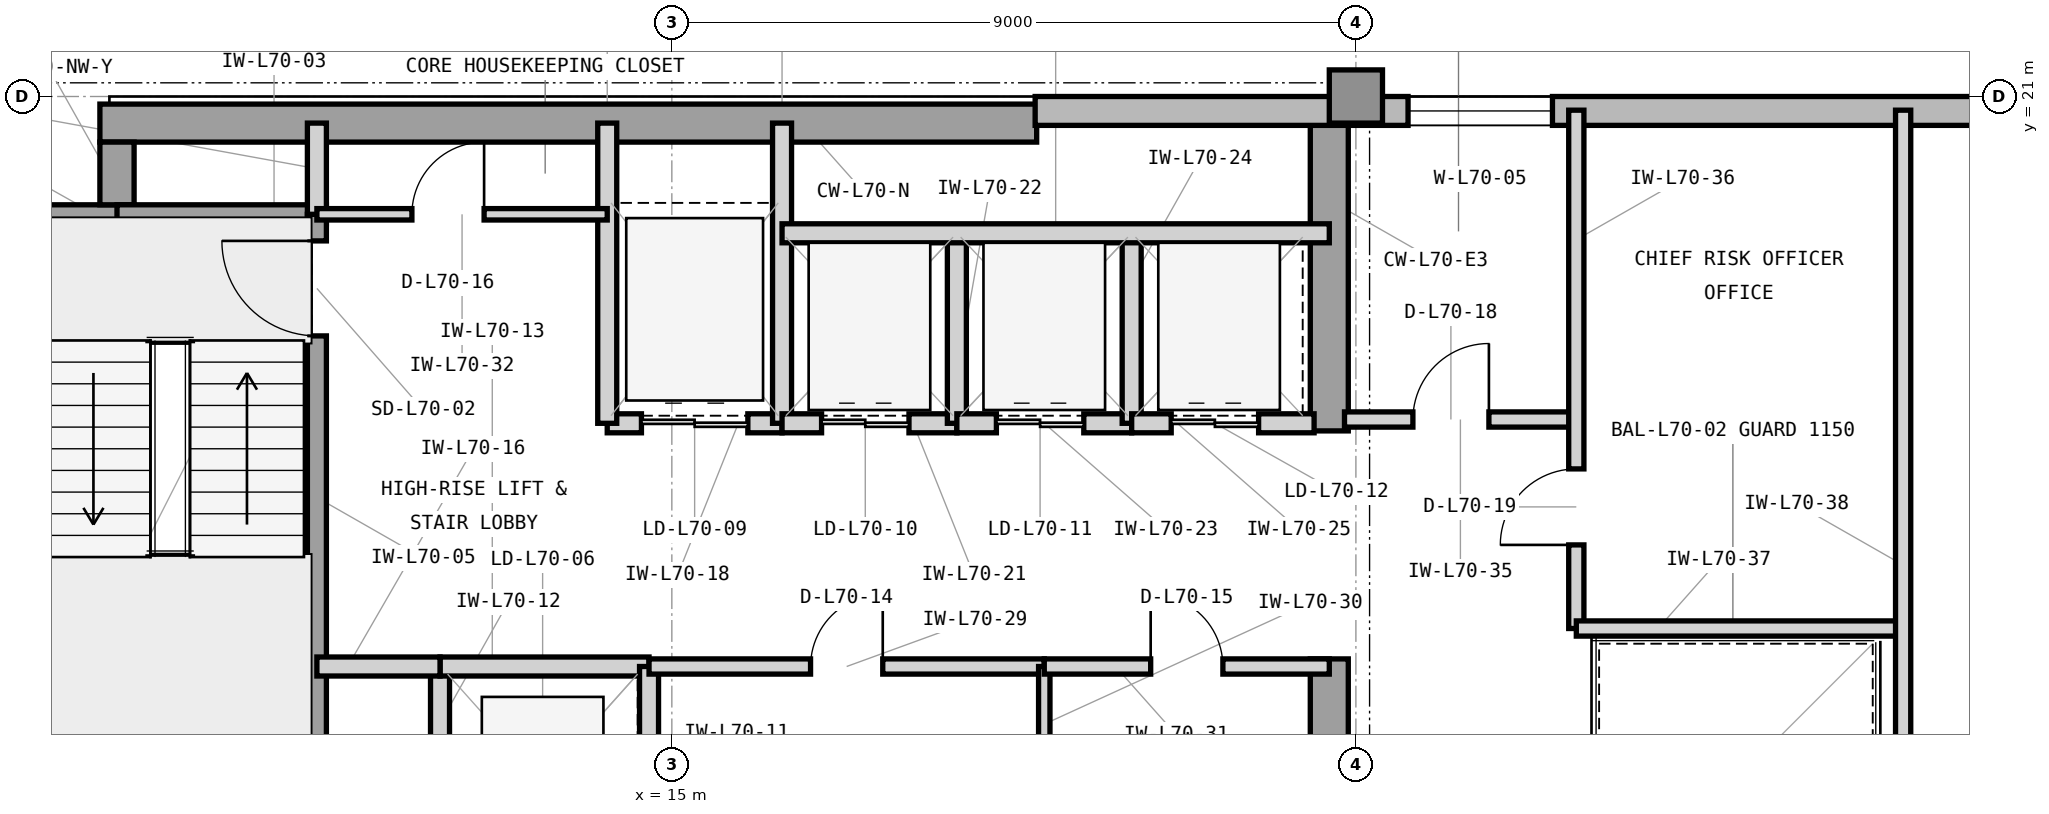
"""IFC4 building model, lengths in metres.
Left out: names, types, materials, properties, quantities, classifications, styles, units other than length and angle.
Written with IfcOpenShell. Run it as: python <this file> out.ifc"""

import sys

from ifc_helpers import new_model, si_unit, direction, frame, frame_2d, origin, origin_2d, place, context, subcontext, project, spatial, rectangle, extrude, element, fill, save


model = new_model("IFC4")
c1 = context("Model", 3, precision=1e-05, world=origin(), true_north=direction((0.0, 1.0)))
c2 = subcontext(c1, "Body", "Model", "MODEL_VIEW")
j1 = project(units=[si_unit("LENGTHUNIT", "METRE"), si_unit("PLANEANGLEUNIT", "RADIAN")], contexts=[c1])
p1 = place(None, origin())
s1 = spatial("IfcSite", under=j1, at=p1, CompositionType="ELEMENT")
p2 = place(p1, origin())
s2 = spatial("IfcBuilding", under=s1, at=p2, CompositionType="ELEMENT")
p3 = place(p2, frame((0.0, 0.0, 285.9)))
s3 = spatial("IfcBuildingStorey", under=s2, at=p3, CompositionType="ELEMENT", Elevation=285.9)
p4 = place(p3, frame((7.475, 20.65, 0.0), z_axis=(0.0, 0.0, 1.0), x_axis=(1.0, 0.0, 0.0)))
e1 = element("IfcWall", 1, at=p4, inside=s3, PredefinedType="SHEAR", context=c2, shape_type="SweptSolid", body=[
    extrude(rectangle(XDim=12.325, YDim=0.5, at=frame_2d((6.163, 0.0))), origin(), (0.0, 0.0, 1.0), 3.9),
])
p5 = place(p3, frame((23.65, 10.4, 0.0), z_axis=(0.0, 0.0, 1.0), x_axis=(0.0, 1.0, 0.0)))
e2 = element("IfcWall", 2, at=p5, inside=s3, PredefinedType="SHEAR", context=c2, shape_type="SweptSolid", body=[
    extrude(rectangle(XDim=3.2, YDim=0.5, at=frame_2d((1.6, 0.0))), origin(), (0.0, 0.0, 1.0), 3.9),
])
p6 = place(p3, frame((23.65, 16.6, 0.0), z_axis=(0.0, 0.0, 1.0), x_axis=(0.0, 1.0, 0.0)))
e3 = element("IfcWall", 3, at=p6, inside=s3, PredefinedType="SHEAR", context=c2, shape_type="SweptSolid", body=[
    extrude(rectangle(XDim=4.05, YDim=0.5, at=frame_2d((2.025, 0.0))), origin(), (0.0, 0.0, 1.0), 3.9),
])
p7 = place(p3, frame((6.6, 19.35, 0.0), z_axis=(0.0, 0.0, 1.0), x_axis=(1.0, 0.0, 0.0)))
e4 = element("IfcWall", 4, at=p7, inside=s3, PredefinedType="SHEAR", context=c2, shape_type="SweptSolid", body=[
    extrude(rectangle(XDim=1.325, YDim=0.45, at=frame_2d((0.663, 0.0))), origin(), (0.0, 0.0, 1.0), 3.9),
])
p8 = place(p3, frame((7.7, 19.575, 0.0), z_axis=(0.0, 0.0, 1.0), x_axis=(0.0, 1.0, 0.0)))
e5 = element("IfcWall", 5, at=p8, inside=s3, PredefinedType="SHEAR", context=c2, shape_type="SweptSolid", body=[
    extrude(rectangle(XDim=0.825, YDim=0.45, at=frame_2d((0.413, 0.0))), origin(), (0.0, 0.0, 1.0), 3.9),
])
p9 = place(p3, frame((24.0, 21.0, 0.0), z_axis=(0.0, 0.0, 1.0), x_axis=(1.0, 0.0, 0.0)))
e6 = element("IfcColumn", 6, at=p9, inside=s3, PredefinedType="COLUMN", context=c2, shape_type="SweptSolid", body=[
    extrude(rectangle(XDim=0.7, YDim=0.7, at=origin_2d()), origin(), (0.0, 0.0, 1.0), 3.9),
])
p10 = place(p3, frame((49.4, 20.81, 0.0), z_axis=(0.0, 0.0, 1.0), x_axis=(-1.0, 0.0, 0.0)))
e7 = element("IfcWall", 7, at=p10, inside=s3, PredefinedType="STANDARD", context=c2, shape_type="SweptSolid", body=[
    extrude(rectangle(XDim=29.62, YDim=0.38, at=frame_2d((14.81, 0.0))), origin(), (0.0, 0.0, 1.0), 3.715),
])
p11 = place(p10, frame((22.814, 0.0, 0.8)))
e8 = element("IfcOpeningElement", 8, at=p11, cuts=e7, PredefinedType="OPENING", context=c2, shape_type="SweptSolid", body=[
    extrude(rectangle(XDim=1.9, YDim=2.35, at=frame_2d((0.95, 1.175))), frame((0.0, 0.2, 0.0), z_axis=(0.0, -1.0, 0.0), x_axis=(1.0, 0.0, 0.0)), (0.0, 0.0, 1.0), 0.4),
])
p12 = place(p10, frame((12.804, 0.0, 0.8)))
e9 = element("IfcOpeningElement", 9, at=p12, cuts=e7, PredefinedType="OPENING", context=c2, shape_type="SweptSolid", body=[
    extrude(rectangle(XDim=2.6, YDim=2.35, at=frame_2d((1.3, 1.175))), frame((0.0, 0.2, 0.0), z_axis=(0.0, -1.0, 0.0), x_axis=(1.0, 0.0, 0.0)), (0.0, 0.0, 1.0), 0.4),
])
p13 = place(p10, frame((8.354, 0.0, 0.8)))
e10 = element("IfcOpeningElement", 10, at=p13, cuts=e7, PredefinedType="OPENING", context=c2, shape_type="SweptSolid", body=[
    extrude(rectangle(XDim=2.6, YDim=2.35, at=frame_2d((1.3, 1.175))), frame((0.0, 0.2, 0.0), z_axis=(0.0, -1.0, 0.0), x_axis=(1.0, 0.0, 0.0)), (0.0, 0.0, 1.0), 0.4),
])
p14 = place(p3, frame((7.7, 19.45, 0.0), z_axis=(0.0, 0.0, 1.0), x_axis=(1.0, 0.0, 0.0)))
e11 = element("IfcWall", 11, at=p14, inside=s3, PredefinedType="SHEAR", context=c2, shape_type="SweptSolid", body=[
    extrude(rectangle(XDim=2.755, YDim=0.25, at=frame_2d((1.377, 0.0))), origin(), (0.0, 0.0, 1.0), 3.9),
])
p15 = place(p3, frame((10.33, 12.0, 0.0), z_axis=(0.0, 0.0, 1.0), x_axis=(0.0, 1.0, 0.0)))
e12 = element("IfcWall", 12, at=p15, inside=s3, PredefinedType="SHEAR", context=c2, shape_type="SweptSolid", body=[
    extrude(rectangle(XDim=7.45, YDim=0.25, at=frame_2d((3.725, 0.0))), origin(), (0.0, 0.0, 1.0), 3.9),
])
p16 = place(p15, frame((5.85, 0.0, 0.0)))
e13 = element("IfcOpeningElement", 13, at=p16, cuts=e12, PredefinedType="OPENING", context=c2, shape_type="SweptSolid", body=[
    extrude(rectangle(XDim=1.25, YDim=2.2, at=frame_2d((0.625, 1.1))), frame((0.0, 0.135, 0.0), z_axis=(0.0, -1.0, 0.0), x_axis=(1.0, 0.0, 0.0)), (0.0, 0.0, 1.0), 0.27),
])
p17 = place(p3, frame((10.33, 19.45, 0.0), z_axis=(0.0, 0.0, 1.0), x_axis=(0.0, 1.0, 0.0)))
e14 = element("IfcWall", 14, at=p17, inside=s3, PredefinedType="PARTITIONING", context=c2, shape_type="SweptSolid", body=[
    extrude(rectangle(XDim=1.2, YDim=0.25, at=frame_2d((0.6, 0.0))), origin(), (0.0, 0.0, 1.0), 3.705),
])
p18 = place(p3, frame((11.95, 10.5, 0.0), z_axis=(0.0, 0.0, 1.0), x_axis=(0.0, 1.0, 0.0)))
e15 = element("IfcWall", 15, at=p18, inside=s3, PredefinedType="PARTITIONING", context=c2, shape_type="SweptSolid", body=[
    extrude(rectangle(XDim=3.0, YDim=0.25, at=frame_2d((1.5, 0.0))), origin(), (0.0, 0.0, 1.0), 3.705),
])
p19 = place(p3, frame((11.95, 13.5, 0.0), z_axis=(0.0, 0.0, 1.0), x_axis=(1.0, 0.0, 0.0)))
e16 = element("IfcWall", 16, at=p19, inside=s3, PredefinedType="PARTITIONING", context=c2, shape_type="SweptSolid", body=[
    extrude(rectangle(XDim=2.75, YDim=0.25, at=frame_2d((1.375, 0.0))), origin(), (0.0, 0.0, 1.0), 3.354),
])
p20 = place(p3, frame((14.7, 10.5, 0.0), z_axis=(0.0, 0.0, 1.0), x_axis=(0.0, 1.0, 0.0)))
e17 = element("IfcWall", 17, at=p20, inside=s3, PredefinedType="PARTITIONING", context=c2, shape_type="SweptSolid", body=[
    extrude(rectangle(XDim=3.0, YDim=0.25, at=frame_2d((1.5, 0.0))), origin(), (0.0, 0.0, 1.0), 3.705),
])
p21 = place(p3, frame((10.33, 13.5, 0.0), z_axis=(0.0, 0.0, 1.0), x_axis=(1.0, 0.0, 0.0)))
e18 = element("IfcWall", 18, at=p21, inside=s3, PredefinedType="PARTITIONING", context=c2, shape_type="SweptSolid", body=[
    extrude(rectangle(XDim=1.62, YDim=0.25, at=frame_2d((0.81, 0.0))), origin(), (0.0, 0.0, 1.0), 3.354),
])
p22 = place(p3, frame((14.15, 16.7, 0.0), z_axis=(0.0, 0.0, 1.0), x_axis=(1.0, 0.0, 0.0)))
e19 = element("IfcWall", 19, at=p22, inside=s3, PredefinedType="PARTITIONING", context=c2, shape_type="SweptSolid", body=[
    extrude(rectangle(XDim=2.3, YDim=0.25, at=frame_2d((1.15, 0.0))), origin(), (0.0, 0.0, 1.0), 3.354),
])
p23 = place(p22, frame((0.45, 0.0, 0.0)))
e20 = element("IfcOpeningElement", 20, at=p23, cuts=e19, PredefinedType="OPENING", context=c2, shape_type="SweptSolid", body=[
    extrude(rectangle(XDim=1.4, YDim=2.35, at=frame_2d((0.7, 1.175))), frame((0.0, 0.135, 0.0), z_axis=(0.0, -1.0, 0.0), x_axis=(1.0, 0.0, 0.0)), (0.0, 0.0, 1.0), 0.27),
])
for number, where, z_axis, x_axis in (
    (21, (14.15, 16.7, 0.0), (0.0, 0.0, 1.0), (0.0, 1.0, 0.0)),
    (22, (16.45, 16.7, 0.0), (0.0, 0.0, 1.0), (0.0, 1.0, 0.0)),
):
    element("IfcWall", number, at=place(p3, frame(where, z_axis=z_axis, x_axis=x_axis)), inside=s3, PredefinedType="PARTITIONING", context=c2, shape_type="SweptSolid", body=[
        extrude(rectangle(XDim=3.95, YDim=0.25, at=frame_2d((1.975, 0.0))), origin(), (0.0, 0.0, 1.0), 3.705),
    ])
p24 = place(p3, frame((16.45, 16.7, 0.0), z_axis=(0.0, 0.0, 1.0), x_axis=(1.0, 0.0, 0.0)))
e23 = element("IfcWall", 23, at=p24, inside=s3, PredefinedType="PARTITIONING", context=c2, shape_type="SweptSolid", body=[
    extrude(rectangle(XDim=2.3, YDim=0.25, at=frame_2d((1.15, 0.0))), origin(), (0.0, 0.0, 1.0), 3.354),
])
p25 = place(p24, frame((0.52, 0.0, 0.0)))
e24 = element("IfcOpeningElement", 24, at=p25, cuts=e23, PredefinedType="OPENING", context=c2, shape_type="SweptSolid", body=[
    extrude(rectangle(XDim=1.15, YDim=2.25, at=frame_2d((0.575, 1.125))), frame((0.0, 0.135, 0.0), z_axis=(0.0, -1.0, 0.0), x_axis=(1.0, 0.0, 0.0)), (0.0, 0.0, 1.0), 0.27),
])
p26 = place(p3, frame((18.75, 16.7, 0.0), z_axis=(0.0, 0.0, 1.0), x_axis=(0.0, 1.0, 0.0)))
e25 = element("IfcWall", 25, at=p26, inside=s3, PredefinedType="PARTITIONING", context=c2, shape_type="SweptSolid", body=[
    extrude(rectangle(XDim=2.5, YDim=0.25, at=frame_2d((1.25, 0.0))), origin(), (0.0, 0.0, 1.0), 3.705),
])
p27 = place(p3, frame((18.75, 16.7, 0.0), z_axis=(0.0, 0.0, 1.0), x_axis=(1.0, 0.0, 0.0)))
e26 = element("IfcWall", 26, at=p27, inside=s3, PredefinedType="PARTITIONING", context=c2, shape_type="SweptSolid", body=[
    extrude(rectangle(XDim=2.3, YDim=0.25, at=frame_2d((1.15, 0.0))), origin(), (0.0, 0.0, 1.0), 3.354),
])
p28 = place(p27, frame((0.52, 0.0, 0.0)))
e27 = element("IfcOpeningElement", 27, at=p28, cuts=e26, PredefinedType="OPENING", context=c2, shape_type="SweptSolid", body=[
    extrude(rectangle(XDim=1.15, YDim=2.25, at=frame_2d((0.575, 1.125))), frame((0.0, 0.135, 0.0), z_axis=(0.0, -1.0, 0.0), x_axis=(1.0, 0.0, 0.0)), (0.0, 0.0, 1.0), 0.27),
])
p29 = place(p3, frame((21.05, 16.7, 0.0), z_axis=(0.0, 0.0, 1.0), x_axis=(0.0, 1.0, 0.0)))
e28 = element("IfcWall", 28, at=p29, inside=s3, PredefinedType="PARTITIONING", context=c2, shape_type="SweptSolid", body=[
    extrude(rectangle(XDim=2.5, YDim=0.25, at=frame_2d((1.25, 0.0))), origin(), (0.0, 0.0, 1.0), 3.705),
])
p30 = place(p3, frame((21.05, 16.7, 0.0), z_axis=(0.0, 0.0, 1.0), x_axis=(1.0, 0.0, 0.0)))
e29 = element("IfcWall", 29, at=p30, inside=s3, PredefinedType="PARTITIONING", context=c2, shape_type="SweptSolid", body=[
    extrude(rectangle(XDim=2.4, YDim=0.25, at=frame_2d((1.2, 0.0))), origin(), (0.0, 0.0, 1.0), 3.354),
])
p31 = place(p30, frame((0.52, 0.0, 0.0)))
e30 = element("IfcOpeningElement", 30, at=p31, cuts=e29, PredefinedType="OPENING", context=c2, shape_type="SweptSolid", body=[
    extrude(rectangle(XDim=1.15, YDim=2.25, at=frame_2d((0.575, 1.125))), frame((0.0, 0.135, 0.0), z_axis=(0.0, -1.0, 0.0), x_axis=(1.0, 0.0, 0.0)), (0.0, 0.0, 1.0), 0.27),
])
p32 = place(p3, frame((16.45, 19.2, 0.0), z_axis=(0.0, 0.0, 1.0), x_axis=(1.0, 0.0, 0.0)))
e31 = element("IfcWall", 31, at=p32, inside=s3, PredefinedType="PARTITIONING", context=c2, shape_type="SweptSolid", body=[
    extrude(rectangle(XDim=7.2, YDim=0.25, at=frame_2d((3.6, 0.0))), origin(), (0.0, 0.0, 1.0), 3.705),
])
p33 = place(p3, frame((14.7, 13.5, 0.0), z_axis=(0.0, 0.0, 1.0), x_axis=(1.0, 0.0, 0.0)))
e32 = element("IfcWall", 32, at=p33, inside=s3, PredefinedType="PARTITIONING", context=c2, shape_type="SweptSolid", body=[
    extrude(rectangle(XDim=5.2, YDim=0.2, at=frame_2d((2.6, 0.0))), origin(), (0.0, 0.0, 1.0), 3.354),
])
p34 = place(p33, frame((2.125, 0.0, 0.0)))
e33 = element("IfcOpeningElement", 33, at=p34, cuts=e32, PredefinedType="OPENING", context=c2, shape_type="SweptSolid", body=[
    extrude(rectangle(XDim=0.95, YDim=2.1, at=frame_2d((0.475, 1.05))), frame((0.0, 0.11, 0.0), z_axis=(0.0, -1.0, 0.0), x_axis=(1.0, 0.0, 0.0)), (0.0, 0.0, 1.0), 0.22),
])
p35 = place(p3, frame((19.9, 10.465, 0.0), z_axis=(0.0, 0.0, 1.0), x_axis=(0.0, 1.0, 0.0)))
e34 = element("IfcWall", 34, at=p35, inside=s3, PredefinedType="PARTITIONING", context=c2, shape_type="SweptSolid", body=[
    extrude(rectangle(XDim=3.035, YDim=0.15, at=frame_2d((1.518, 0.0))), origin(), (0.0, 0.0, 1.0), 3.705),
])
p36 = place(p3, frame((19.9, 13.5, 0.0), z_axis=(0.0, 0.0, 1.0), x_axis=(1.0, 0.0, 0.0)))
e35 = element("IfcWall", 35, at=p36, inside=s3, PredefinedType="PARTITIONING", context=c2, shape_type="SweptSolid", body=[
    extrude(rectangle(XDim=3.75, YDim=0.2, at=frame_2d((1.875, 0.0))), origin(), (0.0, 0.0, 1.0), 3.354),
])
p37 = place(p36, frame((1.4, 0.0, 0.0)))
e36 = element("IfcOpeningElement", 36, at=p37, cuts=e35, PredefinedType="OPENING", context=c2, shape_type="SweptSolid", body=[
    extrude(rectangle(XDim=0.95, YDim=2.1, at=frame_2d((0.475, 1.05))), frame((0.0, 0.11, 0.0), z_axis=(0.0, -1.0, 0.0), x_axis=(1.0, 0.0, 0.0)), (0.0, 0.0, 1.0), 0.22),
])
p38 = place(p3, frame((10.33, 19.45, 0.0), z_axis=(0.0, 0.0, 1.0), x_axis=(1.0, 0.0, 0.0)))
e37 = element("IfcWall", 37, at=p38, inside=s3, PredefinedType="PARTITIONING", context=c2, shape_type="SweptSolid", body=[
    extrude(rectangle(XDim=3.82, YDim=0.15, at=frame_2d((1.91, 0.0))), origin(), (0.0, 0.0, 1.0), 3.705),
])
p39 = place(p38, frame((1.25, 0.0, 0.0)))
e38 = element("IfcOpeningElement", 38, at=p39, cuts=e37, PredefinedType="OPENING", context=c2, shape_type="SweptSolid", body=[
    extrude(rectangle(XDim=0.95, YDim=2.1, at=frame_2d((0.475, 1.05))), frame((0.0, 0.085, 0.0), z_axis=(0.0, -1.0, 0.0), x_axis=(1.0, 0.0, 0.0)), (0.0, 0.0, 1.0), 0.17),
])
p40 = place(p3, frame((23.85, 16.75, 0.0), z_axis=(0.0, 0.0, 1.0), x_axis=(1.0, 0.0, 0.0)))
e39 = element("IfcWall", 39, at=p40, inside=s3, PredefinedType="PARTITIONING", context=c2, shape_type="SweptSolid", body=[
    extrude(rectangle(XDim=3.05, YDim=0.2, at=frame_2d((1.525, 0.0))), origin(), (0.0, 0.0, 1.0), 3.705),
])
p41 = place(p40, frame((0.9, 0.0, 0.0)))
e40 = element("IfcOpeningElement", 40, at=p41, cuts=e39, PredefinedType="OPENING", context=c2, shape_type="SweptSolid", body=[
    extrude(rectangle(XDim=1.0, YDim=2.15, at=frame_2d((0.5, 1.075))), frame((0.0, 0.11, 0.0), z_axis=(0.0, -1.0, 0.0), x_axis=(1.0, 0.0, 0.0)), (0.0, 0.0, 1.0), 0.22),
])
p42 = place(p3, frame((26.9, 14.0, 0.0), z_axis=(0.0, 0.0, 1.0), x_axis=(0.0, 1.0, 0.0)))
e41 = element("IfcWall", 41, at=p42, inside=s3, PredefinedType="PARTITIONING", context=c2, shape_type="SweptSolid", body=[
    extrude(rectangle(XDim=6.82, YDim=0.2, at=frame_2d((3.41, 0.0))), origin(), (0.0, 0.0, 1.0), 3.705),
])
p43 = place(p42, frame((1.1, 0.0, 0.0)))
e42 = element("IfcOpeningElement", 42, at=p43, cuts=e41, PredefinedType="OPENING", context=c2, shape_type="SweptSolid", body=[
    extrude(rectangle(XDim=1.0, YDim=2.15, at=frame_2d((0.5, 1.075))), frame((0.0, 0.11, 0.0), z_axis=(0.0, -1.0, 0.0), x_axis=(1.0, 0.0, 0.0)), (0.0, 0.0, 1.0), 0.22),
])
p44 = place(p3, frame((26.9, 14.0, 0.0), z_axis=(0.0, 0.0, 1.0), x_axis=(1.0, 0.0, 0.0)))
e43 = element("IfcWall", 43, at=p44, inside=s3, PredefinedType="PARTITIONING", context=c2, shape_type="SweptSolid", body=[
    extrude(rectangle(XDim=4.3, YDim=0.2, at=frame_2d((2.15, 0.0))), origin(), (0.0, 0.0, 1.0), 3.705),
])
p45 = place(p3, frame((31.2, 8.85, 0.0), z_axis=(0.0, 0.0, 1.0), x_axis=(0.0, 1.0, 0.0)))
e44 = element("IfcWall", 44, at=p45, inside=s3, PredefinedType="PARTITIONING", context=c2, shape_type="SweptSolid", body=[
    extrude(rectangle(XDim=11.97, YDim=0.2, at=frame_2d((5.985, 0.0))), origin(), (0.0, 0.0, 1.0), 3.705),
])
p46 = place(p16, origin())
e45 = element("IfcDoor", 45, at=p46, inside=s3, OperationType="SINGLE_SWING_RIGHT", PredefinedType="DOOR", context=c2, shape_type="SweptSolid", body=[
    extrude(rectangle(XDim=1.25, YDim=2.2, at=frame_2d((0.625, 1.1))), frame((0.0, 0.025, 0.0), z_axis=(0.0, -1.0, 0.0), x_axis=(1.0, 0.0, 0.0)), (0.0, 0.0, 1.0), 0.05),
])
fill(e13, e45)
p47 = place(p23, origin())
e46 = element("IfcDoor", 46, at=p47, inside=s3, OperationType="DOUBLE_DOOR_SLIDING", PredefinedType="DOOR", context=c2, shape_type="SweptSolid", body=[
    extrude(rectangle(XDim=1.4, YDim=2.35, at=frame_2d((0.7, 1.175))), frame((0.0, 0.025, 0.0), z_axis=(0.0, -1.0, 0.0), x_axis=(1.0, 0.0, 0.0)), (0.0, 0.0, 1.0), 0.05),
])
fill(e20, e46)
p48 = place(p25, origin())
e47 = element("IfcDoor", 47, at=p48, inside=s3, OperationType="DOUBLE_DOOR_SLIDING", PredefinedType="DOOR", context=c2, shape_type="SweptSolid", body=[
    extrude(rectangle(XDim=1.15, YDim=2.25, at=frame_2d((0.575, 1.125))), frame((0.0, 0.025, 0.0), z_axis=(0.0, -1.0, 0.0), x_axis=(1.0, 0.0, 0.0)), (0.0, 0.0, 1.0), 0.05),
])
fill(e24, e47)
p49 = place(p28, origin())
e48 = element("IfcDoor", 48, at=p49, inside=s3, OperationType="DOUBLE_DOOR_SLIDING", PredefinedType="DOOR", context=c2, shape_type="SweptSolid", body=[
    extrude(rectangle(XDim=1.15, YDim=2.25, at=frame_2d((0.575, 1.125))), frame((0.0, 0.025, 0.0), z_axis=(0.0, -1.0, 0.0), x_axis=(1.0, 0.0, 0.0)), (0.0, 0.0, 1.0), 0.05),
])
fill(e27, e48)
p50 = place(p31, origin())
e49 = element("IfcDoor", 49, at=p50, inside=s3, OperationType="DOUBLE_DOOR_SLIDING", PredefinedType="DOOR", context=c2, shape_type="SweptSolid", body=[
    extrude(rectangle(XDim=1.15, YDim=2.25, at=frame_2d((0.575, 1.125))), frame((0.0, 0.025, 0.0), z_axis=(0.0, -1.0, 0.0), x_axis=(1.0, 0.0, 0.0)), (0.0, 0.0, 1.0), 0.05),
])
fill(e30, e49)
p51 = place(p34, origin())
e50 = element("IfcDoor", 50, at=p51, inside=s3, OperationType="SINGLE_SWING_RIGHT", PredefinedType="DOOR", context=c2, shape_type="SweptSolid", body=[
    extrude(rectangle(XDim=0.95, YDim=2.1, at=frame_2d((0.475, 1.05))), frame((0.0, 0.025, 0.0), z_axis=(0.0, -1.0, 0.0), x_axis=(1.0, 0.0, 0.0)), (0.0, 0.0, 1.0), 0.05),
])
fill(e33, e50)
p52 = place(p37, origin())
e51 = element("IfcDoor", 51, at=p52, inside=s3, OperationType="SINGLE_SWING_LEFT", PredefinedType="DOOR", context=c2, shape_type="SweptSolid", body=[
    extrude(rectangle(XDim=0.95, YDim=2.1, at=frame_2d((0.475, 1.05))), frame((0.0, 0.025, 0.0), z_axis=(0.0, -1.0, 0.0), x_axis=(1.0, 0.0, 0.0)), (0.0, 0.0, 1.0), 0.05),
])
fill(e36, e51)
p53 = place(p39, origin())
e52 = element("IfcDoor", 52, at=p53, inside=s3, OperationType="SINGLE_SWING_RIGHT", PredefinedType="DOOR", context=c2, shape_type="SweptSolid", body=[
    extrude(rectangle(XDim=0.95, YDim=2.1, at=frame_2d((0.475, 1.05))), frame((0.0, 0.025, 0.0), z_axis=(0.0, -1.0, 0.0), x_axis=(1.0, 0.0, 0.0)), (0.0, 0.0, 1.0), 0.05),
])
fill(e38, e52)
p54 = place(p41, origin())
e53 = element("IfcDoor", 53, at=p54, inside=s3, OperationType="SINGLE_SWING_RIGHT", PredefinedType="DOOR", context=c2, shape_type="SweptSolid", body=[
    extrude(rectangle(XDim=1.0, YDim=2.15, at=frame_2d((0.5, 1.075))), frame((0.0, 0.025, 0.0), z_axis=(0.0, -1.0, 0.0), x_axis=(1.0, 0.0, 0.0)), (0.0, 0.0, 1.0), 0.05),
])
fill(e40, e53)
p55 = place(p43, origin())
e54 = element("IfcDoor", 54, at=p55, inside=s3, OperationType="SINGLE_SWING_LEFT", PredefinedType="DOOR", context=c2, shape_type="SweptSolid", body=[
    extrude(rectangle(XDim=1.0, YDim=2.15, at=frame_2d((0.5, 1.075))), frame((0.0, 0.025, 0.0), z_axis=(0.0, -1.0, 0.0), x_axis=(1.0, 0.0, 0.0)), (0.0, 0.0, 1.0), 0.05),
])
fill(e42, e54)
p56 = place(p11, origin())
e55 = element("IfcWindow", 55, at=p56, inside=s3, PartitioningType="SINGLE_PANEL", PredefinedType="WINDOW", context=c2, shape_type="SweptSolid", body=[
    extrude(rectangle(XDim=1.9, YDim=2.35, at=frame_2d((0.95, 1.175))), frame((0.0, 0.11, 0.0), z_axis=(0.0, -1.0, 0.0), x_axis=(1.0, 0.0, 0.0)), (0.0, 0.0, 1.0), 0.06),
])
fill(e8, e55)
save(model, sys.argv[1])
